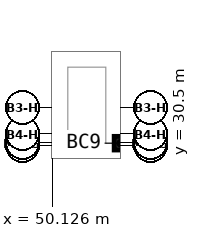
"""IFC4 building model, lengths in metres.
Left out: names, types, materials, properties, quantities, classifications, styles, units other than length and angle.
Written with IfcOpenShell. Run it as: python <this file> out.ifc"""

import sys

from ifc_helpers import new_model, si_unit, direction, frame, origin, origin_2d, place, context, subcontext, project, spatial, rectangle, extrude, source, transform, mapped, element, save


model = new_model("IFC4")
c1 = context("Model", 3, precision=1e-05, world=origin(), true_north=direction((0.0, 1.0)))
c2 = subcontext(c1, "Body", "Model", "MODEL_VIEW")
j1 = project(units=[si_unit("LENGTHUNIT", "METRE"), si_unit("PLANEANGLEUNIT", "RADIAN")], contexts=[c1])
p1 = place(None, origin())
s1 = spatial("IfcSite", under=j1, at=p1, CompositionType="ELEMENT")
p2 = place(p1, origin())
s2 = spatial("IfcBuilding", under=s1, at=p2, CompositionType="ELEMENT")
p3 = place(p2, frame((0.0, 0.0, -4.5)))
s3 = spatial("IfcBuildingStorey", under=s2, at=p3, CompositionType="ELEMENT", Elevation=-4.5)
m1 = source(origin(), c2, "Body", "SweptSolid", [
    extrude(rectangle(XDim=0.9, YDim=0.9, at=origin_2d()), origin(), (0.0, 0.0, 1.0), 4.5),
])
p4 = place(p3, frame((54.65, 30.65, 0.0), z_axis=(0.0, 0.0, 1.0), x_axis=(1.0, 0.0, 0.0)))
e1 = element("IfcColumn", 1, at=p4, inside=s3, PredefinedType="COLUMN", context=c2, shape_type="MappedRepresentation", body=[
    mapped(m1, transform((0.0, 0.0, 0.0))),
])
save(model, sys.argv[1])
